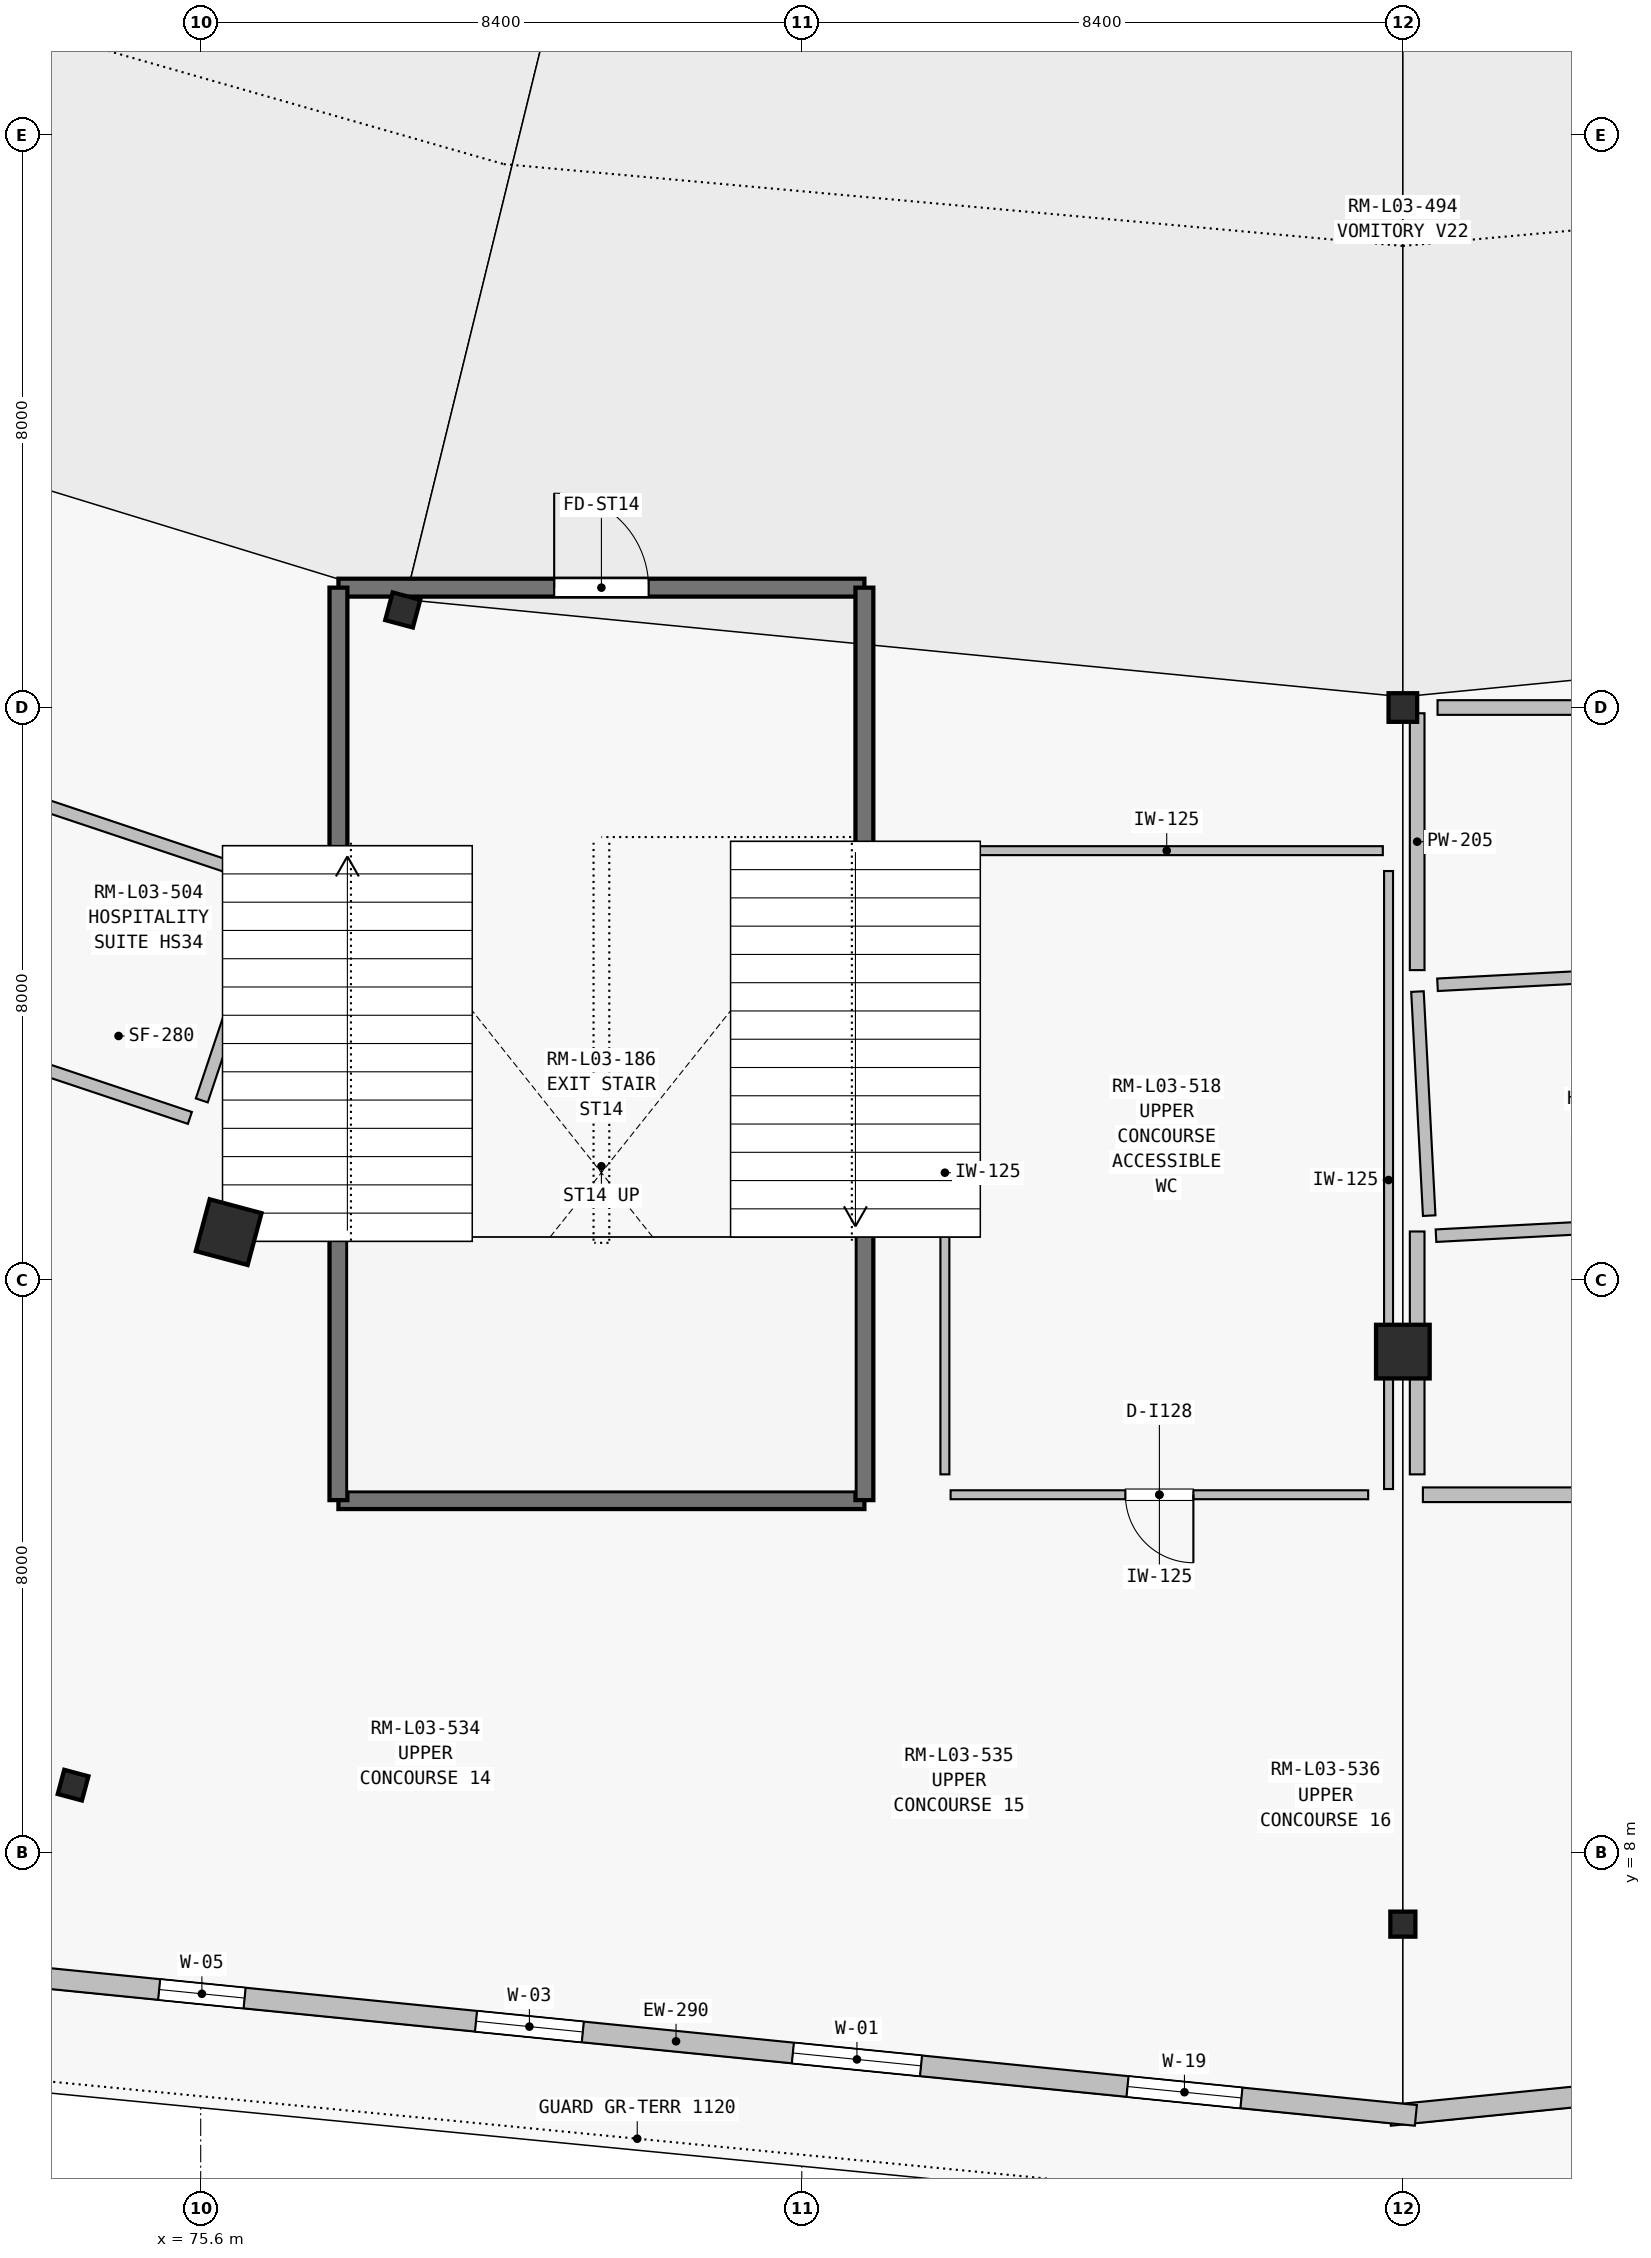
"""IFC4 building model, lengths in metres.
Left out: names, types, materials, properties, quantities, classifications, styles, units other than length and angle.
Written with IfcOpenShell. Run it as: python <this file> out.ifc"""

import sys

from ifc_helpers import new_model, si_unit, direction, frame, frame_2d, origin, origin_2d, place, context, subcontext, project, spatial, rectangle, i_section, extrude, element, fill, save


model = new_model("IFC4")
c1 = context("Model", 3, precision=1e-05, world=origin(), true_north=direction((0.0, 1.0)))
c2 = subcontext(c1, "Body", "Model", "MODEL_VIEW")
j1 = project(units=[si_unit("LENGTHUNIT", "METRE"), si_unit("PLANEANGLEUNIT", "RADIAN")], contexts=[c1])
p1 = place(None, origin())
s1 = spatial("IfcSite", under=j1, at=p1, CompositionType="ELEMENT")
p2 = place(p1, origin())
s2 = spatial("IfcBuilding", under=s1, at=p2, CompositionType="ELEMENT")
p3 = place(p2, frame((0.0, 0.0, 14.4)))
s3 = spatial("IfcBuildingStorey", under=s2, at=p3, CompositionType="ELEMENT", Elevation=14.4)
for number, where, z_axis, x_axis in (
    (1, (78.424, 25.363, 0.0), (0.0, 0.0, 1.0), (-0.259, -0.966, 0.0)),
    (2, (92.4, 24.0, 0.0), (0.0, 0.0, 1.0), (0.0, -1.0, 0.0)),
):
    element("IfcColumn", number, at=place(p3, frame(where, z_axis=z_axis, x_axis=x_axis)), inside=s3, PredefinedType="COLUMN", context=c2, shape_type="SweptSolid", body=[
        extrude(i_section(OverallWidth=0.4, OverallDepth=0.4, WebThickness=0.016, FlangeThickness=0.028, at=origin_2d()), origin(), (0.0, 0.0, 1.0), 4.5),
    ])
for number, where, z_axis, x_axis in (
    (3, (75.991, 16.67, 0.0), (0.0, 0.0, 1.0), (-0.259, -0.966, 0.0)),
    (4, (92.4, 15.0, 0.0), (0.0, 0.0, 1.0), (0.0, -1.0, 0.0)),
):
    element("IfcColumn", number, at=place(p3, frame(where, z_axis=z_axis, x_axis=x_axis)), inside=s3, PredefinedType="COLUMN", context=c2, shape_type="SweptSolid", body=[
        extrude(rectangle(XDim=0.75, YDim=0.75, at=origin_2d()), origin(), (0.0, 0.0, 1.0), 4.5),
    ])
for number, where, z_axis, x_axis in (
    (5, (73.817, 8.942, 0.0), (0.0, 0.0, 1.0), (-0.259, -0.966, 0.0)),
    (6, (92.4, 7.0, 0.0), (0.0, 0.0, 1.0), (0.0, -1.0, 0.0)),
):
    element("IfcColumn", number, at=place(p3, frame(where, z_axis=z_axis, x_axis=x_axis)), inside=s3, PredefinedType="COLUMN", context=c2, shape_type="SweptSolid", body=[
        extrude(i_section(OverallWidth=0.35, OverallDepth=0.35, WebThickness=0.014, FlangeThickness=0.024, at=origin_2d()), origin(), (0.0, 0.0, 1.0), 4.5),
    ])
p4 = place(p3, frame((112.896, 6.399, 0.0), z_axis=(0.0, 0.0, 1.0), x_axis=(-0.995020426289, -0.099671215838, 0.0)))
e7 = element("IfcWall", 7, at=p4, inside=s3, PredefinedType="SOLIDWALL", context=c2, shape_type="SweptSolid", body=[
    extrude(rectangle(XDim=20.781, YDim=0.29, at=frame_2d((10.391, 0.0))), origin(), (0.0, 0.0, 1.0), 4.26),
])
p5 = place(p4, frame((2.025, 0.0, 0.9)))
e8 = element("IfcOpeningElement", 8, at=p5, cuts=e7, PredefinedType="OPENING", context=c2, shape_type="SweptSolid", body=[
    extrude(rectangle(XDim=2.45, YDim=1.35, at=frame_2d((1.225, 0.675))), frame((0.0, 0.155, 0.0), z_axis=(0.0, -1.0, 0.0), x_axis=(1.0, 0.0, 0.0)), (0.0, 0.0, 1.0), 0.31),
])
p6 = place(p4, frame((7.375, 0.0, 0.75)))
e9 = element("IfcOpeningElement", 9, at=p6, cuts=e7, PredefinedType="OPENING", context=c2, shape_type="SweptSolid", body=[
    extrude(rectangle(XDim=0.95, YDim=2.2, at=frame_2d((0.475, 1.1))), frame((0.0, 0.155, 0.0), z_axis=(0.0, -1.0, 0.0), x_axis=(1.0, 0.0, 0.0)), (0.0, 0.0, 1.0), 0.31),
])
p7 = place(p4, frame((11.65, 0.0, 0.9)))
e10 = element("IfcOpeningElement", 10, at=p7, cuts=e7, PredefinedType="OPENING", context=c2, shape_type="SweptSolid", body=[
    extrude(rectangle(XDim=1.6, YDim=1.45, at=frame_2d((0.8, 0.725))), frame((0.0, 0.155, 0.0), z_axis=(0.0, -1.0, 0.0), x_axis=(1.0, 0.0, 0.0)), (0.0, 0.0, 1.0), 0.31),
])
p8 = place(p4, frame((16.15, 0.0, 0.75)))
e11 = element("IfcOpeningElement", 11, at=p8, cuts=e7, PredefinedType="OPENING", context=c2, shape_type="SweptSolid", body=[
    extrude(rectangle(XDim=1.8, YDim=2.4, at=frame_2d((0.9, 1.2))), frame((0.0, 0.155, 0.0), z_axis=(0.0, -1.0, 0.0), x_axis=(1.0, 0.0, 0.0)), (0.0, 0.0, 1.0), 0.31),
])
p9 = place(p3, frame((92.582, 4.327, 0.0), z_axis=(0.0, 0.0, 1.0), x_axis=(-0.995020542998, 0.099670050731, 0.0)))
e12 = element("IfcWall", 12, at=p9, inside=s3, PredefinedType="SOLIDWALL", context=c2, shape_type="SweptSolid", body=[
    extrude(rectangle(XDim=20.781, YDim=0.29, at=frame_2d((10.391, 0.0))), origin(), (0.0, 0.0, 1.0), 4.26),
])
p10 = place(p9, frame((2.45, 0.0, 0.9)))
e13 = element("IfcOpeningElement", 13, at=p10, cuts=e12, PredefinedType="OPENING", context=c2, shape_type="SweptSolid", body=[
    extrude(rectangle(XDim=1.6, YDim=1.45, at=frame_2d((0.8, 0.725))), frame((0.0, 0.155, 0.0), z_axis=(0.0, -1.0, 0.0), x_axis=(1.0, 0.0, 0.0)), (0.0, 0.0, 1.0), 0.31),
])
p11 = place(p9, frame((6.95, 0.0, 0.75)))
e14 = element("IfcOpeningElement", 14, at=p11, cuts=e12, PredefinedType="OPENING", context=c2, shape_type="SweptSolid", body=[
    extrude(rectangle(XDim=1.8, YDim=2.4, at=frame_2d((0.9, 1.2))), frame((0.0, 0.155, 0.0), z_axis=(0.0, -1.0, 0.0), x_axis=(1.0, 0.0, 0.0)), (0.0, 0.0, 1.0), 0.31),
])
p12 = place(p9, frame((11.7, 0.0, 0.75)))
e15 = element("IfcOpeningElement", 15, at=p12, cuts=e12, PredefinedType="OPENING", context=c2, shape_type="SweptSolid", body=[
    extrude(rectangle(XDim=1.5, YDim=2.3, at=frame_2d((0.75, 1.15))), frame((0.0, 0.155, 0.0), z_axis=(0.0, -1.0, 0.0), x_axis=(1.0, 0.0, 0.0)), (0.0, 0.0, 1.0), 0.31),
])
p13 = place(p9, frame((16.45, 0.0, 0.75)))
e16 = element("IfcOpeningElement", 16, at=p13, cuts=e12, PredefinedType="OPENING", context=c2, shape_type="SweptSolid", body=[
    extrude(rectangle(XDim=1.2, YDim=2.2, at=frame_2d((0.6, 1.1))), frame((0.0, 0.155, 0.0), z_axis=(0.0, -1.0, 0.0), x_axis=(1.0, 0.0, 0.0)), (0.0, 0.0, 1.0), 0.31),
])
p14 = place(p3, frame((77.525, 12.925, 0.0), z_axis=(0.0, 0.0, 1.0), x_axis=(1.0, 0.0, 0.0)))
e17 = element("IfcWall", 17, at=p14, inside=s3, PredefinedType="SHEAR", context=c2, shape_type="SweptSolid", body=[
    extrude(rectangle(XDim=7.35, YDim=0.25, at=frame_2d((3.675, 0.0))), origin(), (0.0, 0.0, 1.0), 4.5),
])
p15 = place(p3, frame((77.525, 25.675, 0.0), z_axis=(0.0, 0.0, 1.0), x_axis=(1.0, 0.0, 0.0)))
e18 = element("IfcWall", 18, at=p15, inside=s3, PredefinedType="SHEAR", context=c2, shape_type="SweptSolid", body=[
    extrude(rectangle(XDim=7.35, YDim=0.25, at=frame_2d((3.675, 0.0))), origin(), (0.0, 0.0, 1.0), 4.5),
])
p16 = place(p15, frame((3.015, 0.0, 0.0)))
e19 = element("IfcOpeningElement", 19, at=p16, cuts=e18, PredefinedType="OPENING", context=c2, shape_type="SweptSolid", body=[
    extrude(rectangle(XDim=1.32, YDim=2.2, at=frame_2d((0.66, 1.1))), frame((0.0, 0.135, 0.0), z_axis=(0.0, -1.0, 0.0), x_axis=(1.0, 0.0, 0.0)), (0.0, 0.0, 1.0), 0.27),
])
for number, where, z_axis, x_axis in (
    (20, (77.525, 12.925, 0.0), (0.0, 0.0, 1.0), (0.0, 1.0, 0.0)),
    (21, (84.875, 12.925, 0.0), (0.0, 0.0, 1.0), (0.0, 1.0, 0.0)),
):
    element("IfcWall", number, at=place(p3, frame(where, z_axis=z_axis, x_axis=x_axis)), inside=s3, PredefinedType="SHEAR", context=c2, shape_type="SweptSolid", body=[
        extrude(rectangle(XDim=12.75, YDim=0.25, at=frame_2d((6.375, 0.0))), origin(), (0.0, 0.0, 1.0), 4.5),
    ])
p17 = place(p3, frame((75.449, 18.265, 0.0), z_axis=(0.0, 0.0, 1.0), x_axis=(-0.948325732887, 0.317298446804, 0.0)))
e22 = element("IfcWall", 22, at=p17, inside=s3, PredefinedType="PARTITIONING", context=c2, shape_type="SweptSolid", body=[
    extrude(rectangle(XDim=5.54, YDim=0.175, at=frame_2d((2.77, 0.0))), origin(), (0.0, 0.0, 1.0), 4.2),
])
p18 = place(p17, frame((2.245, 0.0, 0.0)))
e23 = element("IfcOpeningElement", 23, at=p18, cuts=e22, PredefinedType="OPENING", context=c2, shape_type="SweptSolid", body=[
    extrude(rectangle(XDim=1.05, YDim=2.25, at=frame_2d((0.525, 1.125))), frame((0.0, 0.097, 0.0), z_axis=(0.0, -1.0, 0.0), x_axis=(1.0, 0.0, 0.0)), (0.0, 0.0, 1.0), 0.195),
])
p19 = place(p3, frame((71.5, 23.277, 0.0), z_axis=(0.0, 0.0, 1.0), x_axis=(0.94832576744, -0.317298343535, 0.0)))
e24 = element("IfcWall", 24, at=p19, inside=s3, PredefinedType="PARTITIONING", context=c2, shape_type="SweptSolid", body=[
    extrude(rectangle(XDim=5.335, YDim=0.175, at=frame_2d((2.667, 0.0))), origin(), (0.0, 0.0, 1.0), 4.2),
])
p20 = place(p3, frame((76.545, 21.289, 0.0), z_axis=(0.0, 0.0, 1.0), x_axis=(-0.317252319858, -0.948341165164, 0.0)))
e25 = element("IfcWall", 25, at=p20, inside=s3, PredefinedType="PARTITIONING", context=c2, shape_type="SweptSolid", body=[
    extrude(rectangle(XDim=2.93, YDim=0.175, at=frame_2d((1.465, 0.0))), origin(), (0.0, 0.0, 1.0), 4.2),
])
p21 = place(p3, frame((98.395, 16.91, 0.0), z_axis=(0.0, 0.0, 1.0), x_axis=(-0.998628642553, -0.052352977686, 0.0)))
e26 = element("IfcWall", 26, at=p21, inside=s3, PredefinedType="PARTITIONING", context=c2, shape_type="SweptSolid", body=[
    extrude(rectangle(XDim=5.54, YDim=0.175, at=frame_2d((2.77, 0.0))), origin(), (0.0, 0.0, 1.0), 4.18),
])
p22 = place(p3, frame((92.768, 16.9, 0.0), z_axis=(0.0, 0.0, 1.0), x_axis=(-0.05232994845, 0.998629849592, 0.0)))
e27 = element("IfcWall", 27, at=p22, inside=s3, PredefinedType="PARTITIONING", context=c2, shape_type="SweptSolid", body=[
    extrude(rectangle(XDim=3.135, YDim=0.175, at=frame_2d((1.568, 0.0))), origin(), (0.0, 0.0, 1.0), 3.695),
])
p23 = place(p3, frame((92.884, 20.126, 0.0), z_axis=(0.0, 0.0, 1.0), x_axis=(0.998628805132, 0.052349876418, 0.0)))
e28 = element("IfcWall", 28, at=p23, inside=s3, PredefinedType="PARTITIONING", context=c2, shape_type="SweptSolid", body=[
    extrude(rectangle(XDim=5.335, YDim=0.175, at=frame_2d((2.667, 0.0))), origin(), (0.0, 0.0, 1.0), 4.18),
])
p24 = place(p3, frame((86.08, 22.0, 0.0), z_axis=(0.0, 0.0, 1.0), x_axis=(1.0, 0.0, 0.0)))
e29 = element("IfcWall", 29, at=p24, inside=s3, PredefinedType="PARTITIONING", context=c2, shape_type="SweptSolid", body=[
    extrude(rectangle(XDim=6.04, YDim=0.125, at=frame_2d((3.02, 0.0))), origin(), (0.0, 0.0, 1.0), 4.2),
])
p25 = place(p3, frame((92.2, 21.715, 0.0), z_axis=(0.0, 0.0, 1.0), x_axis=(0.0, -1.0, 0.0)))
e30 = element("IfcWall", 30, at=p25, inside=s3, PredefinedType="PARTITIONING", context=c2, shape_type="SweptSolid", body=[
    extrude(rectangle(XDim=8.635, YDim=0.125, at=frame_2d((4.317, 0.0))), origin(), (0.0, 0.0, 1.0), 3.695),
])
p26 = place(p3, frame((91.915, 13.0, 0.0), z_axis=(0.0, 0.0, 1.0), x_axis=(-1.0, 0.0, 0.0)))
e31 = element("IfcWall", 31, at=p26, inside=s3, PredefinedType="PARTITIONING", context=c2, shape_type="SweptSolid", body=[
    extrude(rectangle(XDim=5.835, YDim=0.125, at=frame_2d((2.917, 0.0))), origin(), (0.0, 0.0, 1.0), 4.2),
])
p27 = place(p26, frame((2.443, 0.0, 0.0)))
e32 = element("IfcOpeningElement", 32, at=p27, cuts=e31, PredefinedType="OPENING", context=c2, shape_type="SweptSolid", body=[
    extrude(rectangle(XDim=0.95, YDim=2.1, at=frame_2d((0.475, 1.05))), frame((0.0, 0.073, 0.0), z_axis=(0.0, -1.0, 0.0), x_axis=(1.0, 0.0, 0.0)), (0.0, 0.0, 1.0), 0.145),
])
p28 = place(p3, frame((86.0, 13.285, 0.0), z_axis=(0.0, 0.0, 1.0), x_axis=(0.0, 1.0, 0.0)))
e33 = element("IfcWall", 33, at=p28, inside=s3, PredefinedType="PARTITIONING", context=c2, shape_type="SweptSolid", body=[
    extrude(rectangle(XDim=8.43, YDim=0.125, at=frame_2d((4.215, 0.0))), origin(), (0.0, 0.0, 1.0), 4.2),
])
p29 = place(p3, frame((92.6, 20.331, 0.0), z_axis=(0.0, 0.0, 1.0), x_axis=(0.0, 1.0, 0.0)))
e34 = element("IfcWall", 34, at=p29, inside=s3, PredefinedType="SOLIDWALL", context=c2, shape_type="SweptSolid", body=[
    extrude(rectangle(XDim=3.589, YDim=0.205, at=frame_2d((1.794, 0.0))), origin(), (0.0, 0.0, 1.0), 2.943),
])
p30 = place(p3, frame((92.885, 24.0, 0.0), z_axis=(0.0, 0.0, 1.0), x_axis=(1.0, 0.0, 0.0)))
e35 = element("IfcWall", 35, at=p30, inside=s3, PredefinedType="SOLIDWALL", context=c2, shape_type="SweptSolid", body=[
    extrude(rectangle(XDim=5.835, YDim=0.205, at=frame_2d((2.917, 0.0))), origin(), (0.0, 0.0, 1.0), 2.943),
])
p31 = place(p3, frame((98.515, 13.0, 0.0), z_axis=(0.0, 0.0, 1.0), x_axis=(-1.0, 0.0, 0.0)))
e36 = element("IfcWall", 36, at=p31, inside=s3, PredefinedType="SOLIDWALL", context=c2, shape_type="SweptSolid", body=[
    extrude(rectangle(XDim=5.835, YDim=0.205, at=frame_2d((2.917, 0.0))), origin(), (0.0, 0.0, 1.0), 4.18),
])
p32 = place(p31, frame((2.118, 0.0, 0.0)))
e37 = element("IfcOpeningElement", 37, at=p32, cuts=e36, PredefinedType="OPENING", context=c2, shape_type="SweptSolid", body=[
    extrude(rectangle(XDim=1.6, YDim=2.35, at=frame_2d((0.8, 1.175))), frame((0.0, 0.113, 0.0), z_axis=(0.0, -1.0, 0.0), x_axis=(1.0, 0.0, 0.0)), (0.0, 0.0, 1.0), 0.225),
])
p33 = place(p3, frame((92.6, 13.285, 0.0), z_axis=(0.0, 0.0, 1.0), x_axis=(0.0, 1.0, 0.0)))
e38 = element("IfcWall", 38, at=p33, inside=s3, PredefinedType="SOLIDWALL", context=c2, shape_type="SweptSolid", body=[
    extrude(rectangle(XDim=3.394, YDim=0.205, at=frame_2d((1.697, 0.0))), origin(), (0.0, 0.0, 1.0), 3.695),
])
p34 = place(p10, origin())
e39 = element("IfcWindow", 39, at=p34, inside=s3, PartitioningType="SINGLE_PANEL", PredefinedType="WINDOW", context=c2, shape_type="SweptSolid", body=[
    extrude(rectangle(XDim=1.6, YDim=1.45, at=frame_2d((0.8, 0.725))), frame((0.0, 0.03, 0.0), z_axis=(0.0, -1.0, 0.0), x_axis=(1.0, 0.0, 0.0)), (0.0, 0.0, 1.0), 0.06),
])
fill(e13, e39)
p35 = place(p11, origin())
e40 = element("IfcWindow", 40, at=p35, inside=s3, PartitioningType="SINGLE_PANEL", PredefinedType="WINDOW", context=c2, shape_type="SweptSolid", body=[
    extrude(rectangle(XDim=1.8, YDim=2.4, at=frame_2d((0.9, 1.2))), frame((0.0, 0.03, 0.0), z_axis=(0.0, -1.0, 0.0), x_axis=(1.0, 0.0, 0.0)), (0.0, 0.0, 1.0), 0.06),
])
fill(e14, e40)
p36 = place(p12, origin())
e41 = element("IfcWindow", 41, at=p36, inside=s3, PartitioningType="SINGLE_PANEL", PredefinedType="WINDOW", context=c2, shape_type="SweptSolid", body=[
    extrude(rectangle(XDim=1.5, YDim=2.3, at=frame_2d((0.75, 1.15))), frame((0.0, 0.03, 0.0), z_axis=(0.0, -1.0, 0.0), x_axis=(1.0, 0.0, 0.0)), (0.0, 0.0, 1.0), 0.06),
])
fill(e15, e41)
p37 = place(p13, origin())
e42 = element("IfcWindow", 42, at=p37, inside=s3, PartitioningType="SINGLE_PANEL", PredefinedType="WINDOW", context=c2, shape_type="SweptSolid", body=[
    extrude(rectangle(XDim=1.2, YDim=2.2, at=frame_2d((0.6, 1.1))), frame((0.0, 0.03, 0.0), z_axis=(0.0, -1.0, 0.0), x_axis=(1.0, 0.0, 0.0)), (0.0, 0.0, 1.0), 0.06),
])
fill(e16, e42)
p38 = place(p16, origin())
e43 = element("IfcDoor", 43, at=p38, inside=s3, OperationType="SINGLE_SWING_LEFT", PredefinedType="DOOR", context=c2, shape_type="SweptSolid", body=[
    extrude(rectangle(XDim=1.32, YDim=2.2, at=frame_2d((0.66, 1.1))), frame((0.0, 0.025, 0.0), z_axis=(0.0, -1.0, 0.0), x_axis=(1.0, 0.0, 0.0)), (0.0, 0.0, 1.0), 0.05),
])
fill(e19, e43)
p39 = place(p27, origin())
e44 = element("IfcDoor", 44, at=p39, inside=s3, OperationType="SINGLE_SWING_LEFT", PredefinedType="DOOR", context=c2, shape_type="SweptSolid", body=[
    extrude(rectangle(XDim=0.95, YDim=2.1, at=frame_2d((0.475, 1.05))), frame((0.0, 0.025, 0.0), z_axis=(0.0, -1.0, 0.0), x_axis=(1.0, 0.0, 0.0)), (0.0, 0.0, 1.0), 0.05),
])
fill(e32, e44)
save(model, sys.argv[1])
